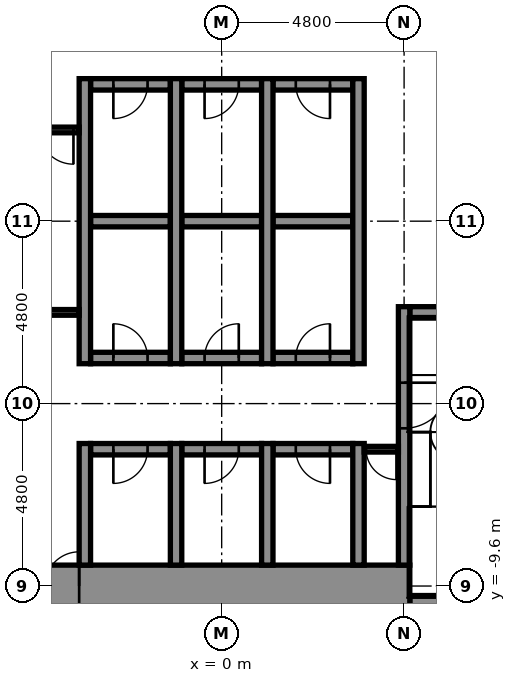
"""IFC4 building model, lengths in metres.
Left out: names, types, materials, properties, quantities, classifications, styles, units other than length and angle.
Written with IfcOpenShell. Run it as: python <this file> out.ifc"""

import sys

from ifc_helpers import new_model, si_unit, direction, frame, frame_2d, origin, place, context, subcontext, project, spatial, rectangle, extrude, element, fill, save


model = new_model("IFC4")
c1 = context("Model", 3, precision=1e-05, world=origin(), true_north=direction((0.0, 1.0)))
c2 = subcontext(c1, "Body", "Model", "MODEL_VIEW")
j1 = project(units=[si_unit("LENGTHUNIT", "METRE"), si_unit("PLANEANGLEUNIT", "RADIAN")], contexts=[c1])
p1 = place(None, origin())
s1 = spatial("IfcSite", under=j1, at=p1, CompositionType="ELEMENT")
p2 = place(p1, origin())
s2 = spatial("IfcBuilding", under=s1, at=p2, CompositionType="ELEMENT")
p3 = place(p2, frame((0.0, 0.0, 38.9)))
s3 = spatial("IfcBuildingStorey", under=s2, at=p3, CompositionType="ELEMENT", Elevation=38.9)
p4 = place(p3, frame((4.95, -10.0, -0.25), z_axis=(0.0, 0.0, 1.0), x_axis=(1.0, 0.0, 0.0)))
e1 = element("IfcWall", 1, at=p4, inside=s3, PredefinedType="STANDARD", context=c2, shape_type="SweptSolid", body=[
    extrude(rectangle(XDim=4.1, YDim=0.3, at=frame_2d((2.05, 0.0))), origin(), (0.0, 0.0, 1.0), 5.5),
])
p5 = place(p3, frame((-5.25, -9.6, -0.25), z_axis=(0.0, 0.0, 1.0), x_axis=(1.0, 0.0, 0.0)))
e2 = element("IfcWall", 2, at=p5, inside=s3, PredefinedType="SHEAR", context=c2, shape_type="SweptSolid", body=[
    extrude(rectangle(XDim=10.2, YDim=1.1, at=frame_2d((5.1, 0.0))), origin(), (0.0, 0.0, 1.0), 5.5),
])
p6 = place(p5, frame((0.6, 0.0, 0.25)))
e3 = element("IfcOpeningElement", 3, at=p6, cuts=e2, PredefinedType="OPENING", context=c2, shape_type="SweptSolid", body=[
    extrude(rectangle(XDim=0.9, YDim=2.1, at=frame_2d((0.45, 1.05))), frame((0.0, 0.56, 0.0), z_axis=(0.0, -1.0, 0.0), x_axis=(1.0, 0.0, 0.0)), (0.0, 0.0, 1.0), 1.12),
])
p7 = place(p3, frame((-3.45, -6.0, -0.25), z_axis=(0.0, 0.0, 1.0), x_axis=(1.0, 0.0, 0.0)))
e4 = element("IfcWall", 4, at=p7, inside=s3, PredefinedType="STANDARD", context=c2, shape_type="SweptSolid", body=[
    extrude(rectangle(XDim=2.1, YDim=0.3, at=frame_2d((1.05, 0.0))), origin(), (0.0, 0.0, 1.0), 5.5),
])
p8 = place(p7, frame((0.6, 0.0, 0.25)))
e5 = element("IfcOpeningElement", 5, at=p8, cuts=e4, PredefinedType="OPENING", context=c2, shape_type="SweptSolid", body=[
    extrude(rectangle(XDim=0.9, YDim=2.1, at=frame_2d((0.45, 1.05))), frame((0.0, 0.16, 0.0), z_axis=(0.0, -1.0, 0.0), x_axis=(1.0, 0.0, 0.0)), (0.0, 0.0, 1.0), 0.32),
])
p9 = place(p3, frame((-1.05, -6.0, -0.25), z_axis=(0.0, 0.0, 1.0), x_axis=(1.0, 0.0, 0.0)))
e6 = element("IfcWall", 6, at=p9, inside=s3, PredefinedType="STANDARD", context=c2, shape_type="SweptSolid", body=[
    extrude(rectangle(XDim=2.1, YDim=0.3, at=frame_2d((1.05, 0.0))), origin(), (0.0, 0.0, 1.0), 5.5),
])
p10 = place(p9, frame((0.6, 0.0, 0.25)))
e7 = element("IfcOpeningElement", 7, at=p10, cuts=e6, PredefinedType="OPENING", context=c2, shape_type="SweptSolid", body=[
    extrude(rectangle(XDim=0.9, YDim=2.1, at=frame_2d((0.45, 1.05))), frame((0.0, 0.16, 0.0), z_axis=(0.0, -1.0, 0.0), x_axis=(1.0, 0.0, 0.0)), (0.0, 0.0, 1.0), 0.32),
])
p11 = place(p3, frame((1.35, -6.0, -0.25), z_axis=(0.0, 0.0, 1.0), x_axis=(1.0, 0.0, 0.0)))
e8 = element("IfcWall", 8, at=p11, inside=s3, PredefinedType="STANDARD", context=c2, shape_type="SweptSolid", body=[
    extrude(rectangle(XDim=2.1, YDim=0.3, at=frame_2d((1.05, 0.0))), origin(), (0.0, 0.0, 1.0), 5.5),
])
p12 = place(p11, frame((0.6, 0.0, 0.25)))
e9 = element("IfcOpeningElement", 9, at=p12, cuts=e8, PredefinedType="OPENING", context=c2, shape_type="SweptSolid", body=[
    extrude(rectangle(XDim=0.9, YDim=2.1, at=frame_2d((0.45, 1.05))), frame((0.0, 0.16, 0.0), z_axis=(0.0, -1.0, 0.0), x_axis=(1.0, 0.0, 0.0)), (0.0, 0.0, 1.0), 0.32),
])
p13 = place(p3, frame((-3.45, -3.6, -0.25), z_axis=(0.0, 0.0, 1.0), x_axis=(1.0, 0.0, 0.0)))
e10 = element("IfcWall", 10, at=p13, inside=s3, PredefinedType="STANDARD", context=c2, shape_type="SweptSolid", body=[
    extrude(rectangle(XDim=2.1, YDim=0.3, at=frame_2d((1.05, 0.0))), origin(), (0.0, 0.0, 1.0), 5.5),
])
p14 = place(p13, frame((0.6, 0.0, 0.25)))
e11 = element("IfcOpeningElement", 11, at=p14, cuts=e10, PredefinedType="OPENING", context=c2, shape_type="SweptSolid", body=[
    extrude(rectangle(XDim=0.9, YDim=2.1, at=frame_2d((0.45, 1.05))), frame((0.0, 0.16, 0.0), z_axis=(0.0, -1.0, 0.0), x_axis=(1.0, 0.0, 0.0)), (0.0, 0.0, 1.0), 0.32),
])
p15 = place(p3, frame((-1.05, -3.6, -0.25), z_axis=(0.0, 0.0, 1.0), x_axis=(1.0, 0.0, 0.0)))
e12 = element("IfcWall", 12, at=p15, inside=s3, PredefinedType="STANDARD", context=c2, shape_type="SweptSolid", body=[
    extrude(rectangle(XDim=2.1, YDim=0.3, at=frame_2d((1.05, 0.0))), origin(), (0.0, 0.0, 1.0), 5.5),
])
p16 = place(p15, frame((0.6, 0.0, 0.25)))
e13 = element("IfcOpeningElement", 13, at=p16, cuts=e12, PredefinedType="OPENING", context=c2, shape_type="SweptSolid", body=[
    extrude(rectangle(XDim=0.9, YDim=2.1, at=frame_2d((0.45, 1.05))), frame((0.0, 0.16, 0.0), z_axis=(0.0, -1.0, 0.0), x_axis=(1.0, 0.0, 0.0)), (0.0, 0.0, 1.0), 0.32),
])
p17 = place(p3, frame((1.35, -3.6, -0.25), z_axis=(0.0, 0.0, 1.0), x_axis=(1.0, 0.0, 0.0)))
e14 = element("IfcWall", 14, at=p17, inside=s3, PredefinedType="STANDARD", context=c2, shape_type="SweptSolid", body=[
    extrude(rectangle(XDim=2.1, YDim=0.3, at=frame_2d((1.05, 0.0))), origin(), (0.0, 0.0, 1.0), 5.5),
])
p18 = place(p17, frame((0.6, 0.0, 0.25)))
e15 = element("IfcOpeningElement", 15, at=p18, cuts=e14, PredefinedType="OPENING", context=c2, shape_type="SweptSolid", body=[
    extrude(rectangle(XDim=0.9, YDim=2.1, at=frame_2d((0.45, 1.05))), frame((0.0, 0.16, 0.0), z_axis=(0.0, -1.0, 0.0), x_axis=(1.0, 0.0, 0.0)), (0.0, 0.0, 1.0), 0.32),
])
p19 = place(p3, frame((4.95, -2.4, -0.25), z_axis=(0.0, 0.0, 1.0), x_axis=(1.0, 0.0, 0.0)))
e16 = element("IfcWall", 16, at=p19, inside=s3, PredefinedType="STANDARD", context=c2, shape_type="SweptSolid", body=[
    extrude(rectangle(XDim=0.9, YDim=0.3, at=frame_2d((0.45, 0.0))), origin(), (0.0, 0.0, 1.0), 5.5),
])
p20 = place(p3, frame((-3.45, 0.0, -0.25), z_axis=(0.0, 0.0, 1.0), x_axis=(1.0, 0.0, 0.0)))
e17 = element("IfcWall", 17, at=p20, inside=s3, PredefinedType="STANDARD", context=c2, shape_type="SweptSolid", body=[
    extrude(rectangle(XDim=2.1, YDim=0.3, at=frame_2d((1.05, 0.0))), origin(), (0.0, 0.0, 1.0), 5.5),
])
p21 = place(p3, frame((-1.05, 0.0, -0.25), z_axis=(0.0, 0.0, 1.0), x_axis=(1.0, 0.0, 0.0)))
e18 = element("IfcWall", 18, at=p21, inside=s3, PredefinedType="STANDARD", context=c2, shape_type="SweptSolid", body=[
    extrude(rectangle(XDim=2.1, YDim=0.3, at=frame_2d((1.05, 0.0))), origin(), (0.0, 0.0, 1.0), 5.5),
])
p22 = place(p3, frame((1.35, 0.0, -0.25), z_axis=(0.0, 0.0, 1.0), x_axis=(1.0, 0.0, 0.0)))
e19 = element("IfcWall", 19, at=p22, inside=s3, PredefinedType="STANDARD", context=c2, shape_type="SweptSolid", body=[
    extrude(rectangle(XDim=2.1, YDim=0.3, at=frame_2d((1.05, 0.0))), origin(), (0.0, 0.0, 1.0), 5.5),
])
p23 = place(p3, frame((-3.45, 3.6, -0.25), z_axis=(0.0, 0.0, 1.0), x_axis=(1.0, 0.0, 0.0)))
e20 = element("IfcWall", 20, at=p23, inside=s3, PredefinedType="STANDARD", context=c2, shape_type="SweptSolid", body=[
    extrude(rectangle(XDim=2.1, YDim=0.3, at=frame_2d((1.05, 0.0))), origin(), (0.0, 0.0, 1.0), 5.5),
])
p24 = place(p23, frame((0.6, 0.0, 0.25)))
e21 = element("IfcOpeningElement", 21, at=p24, cuts=e20, PredefinedType="OPENING", context=c2, shape_type="SweptSolid", body=[
    extrude(rectangle(XDim=0.9, YDim=2.1, at=frame_2d((0.45, 1.05))), frame((0.0, 0.16, 0.0), z_axis=(0.0, -1.0, 0.0), x_axis=(1.0, 0.0, 0.0)), (0.0, 0.0, 1.0), 0.32),
])
p25 = place(p3, frame((-1.05, 3.6, -0.25), z_axis=(0.0, 0.0, 1.0), x_axis=(1.0, 0.0, 0.0)))
e22 = element("IfcWall", 22, at=p25, inside=s3, PredefinedType="STANDARD", context=c2, shape_type="SweptSolid", body=[
    extrude(rectangle(XDim=2.1, YDim=0.3, at=frame_2d((1.05, 0.0))), origin(), (0.0, 0.0, 1.0), 5.5),
])
p26 = place(p25, frame((0.6, 0.0, 0.25)))
e23 = element("IfcOpeningElement", 23, at=p26, cuts=e22, PredefinedType="OPENING", context=c2, shape_type="SweptSolid", body=[
    extrude(rectangle(XDim=0.9, YDim=2.1, at=frame_2d((0.45, 1.05))), frame((0.0, 0.16, 0.0), z_axis=(0.0, -1.0, 0.0), x_axis=(1.0, 0.0, 0.0)), (0.0, 0.0, 1.0), 0.32),
])
p27 = place(p3, frame((1.35, 3.6, -0.25), z_axis=(0.0, 0.0, 1.0), x_axis=(1.0, 0.0, 0.0)))
e24 = element("IfcWall", 24, at=p27, inside=s3, PredefinedType="STANDARD", context=c2, shape_type="SweptSolid", body=[
    extrude(rectangle(XDim=2.1, YDim=0.3, at=frame_2d((1.05, 0.0))), origin(), (0.0, 0.0, 1.0), 5.5),
])
p28 = place(p27, frame((0.6, 0.0, 0.25)))
e25 = element("IfcOpeningElement", 25, at=p28, cuts=e24, PredefinedType="OPENING", context=c2, shape_type="SweptSolid", body=[
    extrude(rectangle(XDim=0.9, YDim=2.1, at=frame_2d((0.45, 1.05))), frame((0.0, 0.16, 0.0), z_axis=(0.0, -1.0, 0.0), x_axis=(1.0, 0.0, 0.0)), (0.0, 0.0, 1.0), 0.32),
])
p29 = place(p3, frame((-3.6, -9.05, -0.25), z_axis=(0.0, 0.0, 1.0), x_axis=(0.0, 1.0, 0.0)))
e26 = element("IfcWall", 26, at=p29, inside=s3, PredefinedType="STANDARD", context=c2, shape_type="SweptSolid", body=[
    extrude(rectangle(XDim=3.2, YDim=0.3, at=frame_2d((1.6, 0.0))), origin(), (0.0, 0.0, 1.0), 5.5),
])
p30 = place(p3, frame((-3.6, -3.75, -0.25), z_axis=(0.0, 0.0, 1.0), x_axis=(0.0, 1.0, 0.0)))
e27 = element("IfcWall", 27, at=p30, inside=s3, PredefinedType="STANDARD", context=c2, shape_type="SweptSolid", body=[
    extrude(rectangle(XDim=7.5, YDim=0.3, at=frame_2d((3.75, 0.0))), origin(), (0.0, 0.0, 1.0), 5.5),
])
p31 = place(p3, frame((-1.2, -9.05, -0.25), z_axis=(0.0, 0.0, 1.0), x_axis=(0.0, 1.0, 0.0)))
e28 = element("IfcWall", 28, at=p31, inside=s3, PredefinedType="STANDARD", context=c2, shape_type="SweptSolid", body=[
    extrude(rectangle(XDim=3.2, YDim=0.3, at=frame_2d((1.6, 0.0))), origin(), (0.0, 0.0, 1.0), 5.5),
])
p32 = place(p3, frame((-1.2, -3.75, -0.25), z_axis=(0.0, 0.0, 1.0), x_axis=(0.0, 1.0, 0.0)))
e29 = element("IfcWall", 29, at=p32, inside=s3, PredefinedType="STANDARD", context=c2, shape_type="SweptSolid", body=[
    extrude(rectangle(XDim=7.5, YDim=0.3, at=frame_2d((3.75, 0.0))), origin(), (0.0, 0.0, 1.0), 5.5),
])
p33 = place(p3, frame((1.2, -9.05, -0.25), z_axis=(0.0, 0.0, 1.0), x_axis=(0.0, 1.0, 0.0)))
e30 = element("IfcWall", 30, at=p33, inside=s3, PredefinedType="STANDARD", context=c2, shape_type="SweptSolid", body=[
    extrude(rectangle(XDim=3.2, YDim=0.3, at=frame_2d((1.6, 0.0))), origin(), (0.0, 0.0, 1.0), 5.5),
])
p34 = place(p3, frame((1.2, -3.75, -0.25), z_axis=(0.0, 0.0, 1.0), x_axis=(0.0, 1.0, 0.0)))
e31 = element("IfcWall", 31, at=p34, inside=s3, PredefinedType="STANDARD", context=c2, shape_type="SweptSolid", body=[
    extrude(rectangle(XDim=7.5, YDim=0.3, at=frame_2d((3.75, 0.0))), origin(), (0.0, 0.0, 1.0), 5.5),
])
p35 = place(p3, frame((3.6, -9.05, -0.25), z_axis=(0.0, 0.0, 1.0), x_axis=(0.0, 1.0, 0.0)))
e32 = element("IfcWall", 32, at=p35, inside=s3, PredefinedType="STANDARD", context=c2, shape_type="SweptSolid", body=[
    extrude(rectangle(XDim=3.2, YDim=0.3, at=frame_2d((1.6, 0.0))), origin(), (0.0, 0.0, 1.0), 5.5),
])
p36 = place(p3, frame((3.6, -3.75, -0.25), z_axis=(0.0, 0.0, 1.0), x_axis=(0.0, 1.0, 0.0)))
e33 = element("IfcWall", 33, at=p36, inside=s3, PredefinedType="STANDARD", context=c2, shape_type="SweptSolid", body=[
    extrude(rectangle(XDim=7.5, YDim=0.3, at=frame_2d((3.75, 0.0))), origin(), (0.0, 0.0, 1.0), 5.5),
])
p37 = place(p3, frame((4.8, -9.05, -0.25), z_axis=(0.0, 0.0, 1.0), x_axis=(0.0, 1.0, 0.0)))
e34 = element("IfcWall", 34, at=p37, inside=s3, PredefinedType="STANDARD", context=c2, shape_type="SweptSolid", body=[
    extrude(rectangle(XDim=6.8, YDim=0.3, at=frame_2d((3.4, 0.0))), origin(), (0.0, 0.0, 1.0), 5.5),
])
p38 = place(p37, frame((3.6, 0.0, 0.25)))
e35 = element("IfcOpeningElement", 35, at=p38, cuts=e34, PredefinedType="OPENING", context=c2, shape_type="SweptSolid", body=[
    extrude(rectangle(XDim=1.2, YDim=2.1, at=frame_2d((0.6, 1.05))), frame((0.0, 0.16, 0.0), z_axis=(0.0, -1.0, 0.0), x_axis=(1.0, 0.0, 0.0)), (0.0, 0.0, 1.0), 0.32),
])
p39 = place(p3, frame((3.75, -6.0, 0.0), z_axis=(0.0, 0.0, 1.0), x_axis=(1.0, 0.0, 0.0)))
e36 = element("IfcWall", 36, at=p39, inside=s3, PredefinedType="PARTITIONING", context=c2, shape_type="SweptSolid", body=[
    extrude(rectangle(XDim=0.9, YDim=0.15, at=frame_2d((0.45, 0.0))), origin(), (0.0, 0.0, 1.0), 5.25),
])
p40 = place(p39, frame((0.05, 0.0, 0.0)))
e37 = element("IfcOpeningElement", 37, at=p40, cuts=e36, PredefinedType="OPENING", context=c2, shape_type="SweptSolid", body=[
    extrude(rectangle(XDim=0.8, YDim=2.1, at=frame_2d((0.4, 1.05))), frame((0.0, 0.085, 0.0), z_axis=(0.0, -1.0, 0.0), x_axis=(1.0, 0.0, 0.0)), (0.0, 0.0, 1.0), 0.17),
])
p41 = place(p3, frame((-4.95, 2.4, 0.0), z_axis=(0.0, 0.0, 1.0), x_axis=(1.0, 0.0, 0.0)))
e38 = element("IfcWall", 38, at=p41, inside=s3, PredefinedType="PARTITIONING", context=c2, shape_type="SweptSolid", body=[
    extrude(rectangle(XDim=1.2, YDim=0.15, at=frame_2d((0.6, 0.0))), origin(), (0.0, 0.0, 1.0), 5.25),
])
p42 = place(p41, frame((0.15, 0.0, 0.0)))
e39 = element("IfcOpeningElement", 39, at=p42, cuts=e38, PredefinedType="OPENING", context=c2, shape_type="SweptSolid", body=[
    extrude(rectangle(XDim=0.9, YDim=2.1, at=frame_2d((0.45, 1.05))), frame((0.0, 0.085, 0.0), z_axis=(0.0, -1.0, 0.0), x_axis=(1.0, 0.0, 0.0)), (0.0, 0.0, 1.0), 0.17),
])
p43 = place(p3, frame((-4.95, -2.4, 0.0), z_axis=(0.0, 0.0, 1.0), x_axis=(1.0, 0.0, 0.0)))
e40 = element("IfcWall", 40, at=p43, inside=s3, PredefinedType="PARTITIONING", context=c2, shape_type="SweptSolid", body=[
    extrude(rectangle(XDim=1.2, YDim=0.15, at=frame_2d((0.6, 0.0))), origin(), (0.0, 0.0, 1.0), 5.25),
])
p44 = place(p40, frame((0.8, 0.0, 0.0), z_axis=(0.0, 0.0, 1.0), x_axis=(-1.0, 0.0, 0.0)))
e41 = element("IfcDoor", 41, at=p44, inside=s3, OperationType="SINGLE_SWING_RIGHT", PredefinedType="DOOR", context=c2, shape_type="SweptSolid", body=[
    extrude(rectangle(XDim=0.8, YDim=2.1, at=frame_2d((0.4, 1.05))), frame((0.0, 0.025, 0.0), z_axis=(0.0, -1.0, 0.0), x_axis=(1.0, 0.0, 0.0)), (0.0, 0.0, 1.0), 0.05),
])
fill(e37, e41)
p45 = place(p38, frame((1.2, 0.0, 0.0), z_axis=(0.0, 0.0, 1.0), x_axis=(-1.0, 0.0, 0.0)))
e42 = element("IfcDoor", 42, at=p45, inside=s3, OperationType="SINGLE_SWING_RIGHT", PredefinedType="DOOR", context=c2, shape_type="SweptSolid", body=[
    extrude(rectangle(XDim=1.2, YDim=2.1, at=frame_2d((0.6, 1.05))), frame((0.0, 0.025, 0.0), z_axis=(0.0, -1.0, 0.0), x_axis=(1.0, 0.0, 0.0)), (0.0, 0.0, 1.0), 0.05),
])
fill(e35, e42)
p46 = place(p24, frame((0.9, 0.0, 0.0), z_axis=(0.0, 0.0, 1.0), x_axis=(-1.0, 0.0, 0.0)))
e43 = element("IfcDoor", 43, at=p46, inside=s3, OperationType="SINGLE_SWING_LEFT", PredefinedType="DOOR", context=c2, shape_type="SweptSolid", body=[
    extrude(rectangle(XDim=0.9, YDim=2.1, at=frame_2d((0.45, 1.05))), frame((0.0, 0.025, 0.0), z_axis=(0.0, -1.0, 0.0), x_axis=(1.0, 0.0, 0.0)), (0.0, 0.0, 1.0), 0.05),
])
fill(e21, e43)
p47 = place(p26, frame((0.9, 0.0, 0.0), z_axis=(0.0, 0.0, 1.0), x_axis=(-1.0, 0.0, 0.0)))
e44 = element("IfcDoor", 44, at=p47, inside=s3, OperationType="SINGLE_SWING_LEFT", PredefinedType="DOOR", context=c2, shape_type="SweptSolid", body=[
    extrude(rectangle(XDim=0.9, YDim=2.1, at=frame_2d((0.45, 1.05))), frame((0.0, 0.025, 0.0), z_axis=(0.0, -1.0, 0.0), x_axis=(1.0, 0.0, 0.0)), (0.0, 0.0, 1.0), 0.05),
])
fill(e23, e44)
p48 = place(p28, frame((0.9, 0.0, 0.0), z_axis=(0.0, 0.0, 1.0), x_axis=(-1.0, 0.0, 0.0)))
e45 = element("IfcDoor", 45, at=p48, inside=s3, OperationType="SINGLE_SWING_RIGHT", PredefinedType="DOOR", context=c2, shape_type="SweptSolid", body=[
    extrude(rectangle(XDim=0.9, YDim=2.1, at=frame_2d((0.45, 1.05))), frame((0.0, 0.025, 0.0), z_axis=(0.0, -1.0, 0.0), x_axis=(1.0, 0.0, 0.0)), (0.0, 0.0, 1.0), 0.05),
])
fill(e25, e45)
p49 = place(p14, origin())
e46 = element("IfcDoor", 46, at=p49, inside=s3, OperationType="SINGLE_SWING_LEFT", PredefinedType="DOOR", context=c2, shape_type="SweptSolid", body=[
    extrude(rectangle(XDim=0.9, YDim=2.1, at=frame_2d((0.45, 1.05))), frame((0.0, 0.025, 0.0), z_axis=(0.0, -1.0, 0.0), x_axis=(1.0, 0.0, 0.0)), (0.0, 0.0, 1.0), 0.05),
])
fill(e11, e46)
p50 = place(p16, origin())
e47 = element("IfcDoor", 47, at=p50, inside=s3, OperationType="SINGLE_SWING_RIGHT", PredefinedType="DOOR", context=c2, shape_type="SweptSolid", body=[
    extrude(rectangle(XDim=0.9, YDim=2.1, at=frame_2d((0.45, 1.05))), frame((0.0, 0.025, 0.0), z_axis=(0.0, -1.0, 0.0), x_axis=(1.0, 0.0, 0.0)), (0.0, 0.0, 1.0), 0.05),
])
fill(e13, e47)
p51 = place(p18, origin())
e48 = element("IfcDoor", 48, at=p51, inside=s3, OperationType="SINGLE_SWING_RIGHT", PredefinedType="DOOR", context=c2, shape_type="SweptSolid", body=[
    extrude(rectangle(XDim=0.9, YDim=2.1, at=frame_2d((0.45, 1.05))), frame((0.0, 0.025, 0.0), z_axis=(0.0, -1.0, 0.0), x_axis=(1.0, 0.0, 0.0)), (0.0, 0.0, 1.0), 0.05),
])
fill(e15, e48)
p52 = place(p8, frame((0.9, 0.0, 0.0), z_axis=(0.0, 0.0, 1.0), x_axis=(-1.0, 0.0, 0.0)))
e49 = element("IfcDoor", 49, at=p52, inside=s3, OperationType="SINGLE_SWING_LEFT", PredefinedType="DOOR", context=c2, shape_type="SweptSolid", body=[
    extrude(rectangle(XDim=0.9, YDim=2.1, at=frame_2d((0.45, 1.05))), frame((0.0, 0.025, 0.0), z_axis=(0.0, -1.0, 0.0), x_axis=(1.0, 0.0, 0.0)), (0.0, 0.0, 1.0), 0.05),
])
fill(e5, e49)
p53 = place(p10, frame((0.9, 0.0, 0.0), z_axis=(0.0, 0.0, 1.0), x_axis=(-1.0, 0.0, 0.0)))
e50 = element("IfcDoor", 50, at=p53, inside=s3, OperationType="SINGLE_SWING_LEFT", PredefinedType="DOOR", context=c2, shape_type="SweptSolid", body=[
    extrude(rectangle(XDim=0.9, YDim=2.1, at=frame_2d((0.45, 1.05))), frame((0.0, 0.025, 0.0), z_axis=(0.0, -1.0, 0.0), x_axis=(1.0, 0.0, 0.0)), (0.0, 0.0, 1.0), 0.05),
])
fill(e7, e50)
p54 = place(p12, frame((0.9, 0.0, 0.0), z_axis=(0.0, 0.0, 1.0), x_axis=(-1.0, 0.0, 0.0)))
e51 = element("IfcDoor", 51, at=p54, inside=s3, OperationType="SINGLE_SWING_RIGHT", PredefinedType="DOOR", context=c2, shape_type="SweptSolid", body=[
    extrude(rectangle(XDim=0.9, YDim=2.1, at=frame_2d((0.45, 1.05))), frame((0.0, 0.025, 0.0), z_axis=(0.0, -1.0, 0.0), x_axis=(1.0, 0.0, 0.0)), (0.0, 0.0, 1.0), 0.05),
])
fill(e9, e51)
p55 = place(p6, origin())
e52 = element("IfcDoor", 52, at=p55, inside=s3, OperationType="SINGLE_SWING_RIGHT", PredefinedType="DOOR", context=c2, shape_type="SweptSolid", body=[
    extrude(rectangle(XDim=0.9, YDim=2.1, at=frame_2d((0.45, 1.05))), frame((0.0, 0.025, 0.0), z_axis=(0.0, -1.0, 0.0), x_axis=(1.0, 0.0, 0.0)), (0.0, 0.0, 1.0), 0.05),
])
fill(e3, e52)
p56 = place(p42, frame((0.9, 0.0, 0.0), z_axis=(0.0, 0.0, 1.0), x_axis=(-1.0, 0.0, 0.0)))
e53 = element("IfcDoor", 53, at=p56, inside=s3, OperationType="SINGLE_SWING_RIGHT", PredefinedType="DOOR", context=c2, shape_type="SweptSolid", body=[
    extrude(rectangle(XDim=0.9, YDim=2.1, at=frame_2d((0.45, 1.05))), frame((0.0, 0.025, 0.0), z_axis=(0.0, -1.0, 0.0), x_axis=(1.0, 0.0, 0.0)), (0.0, 0.0, 1.0), 0.05),
])
fill(e39, e53)
save(model, sys.argv[1])
